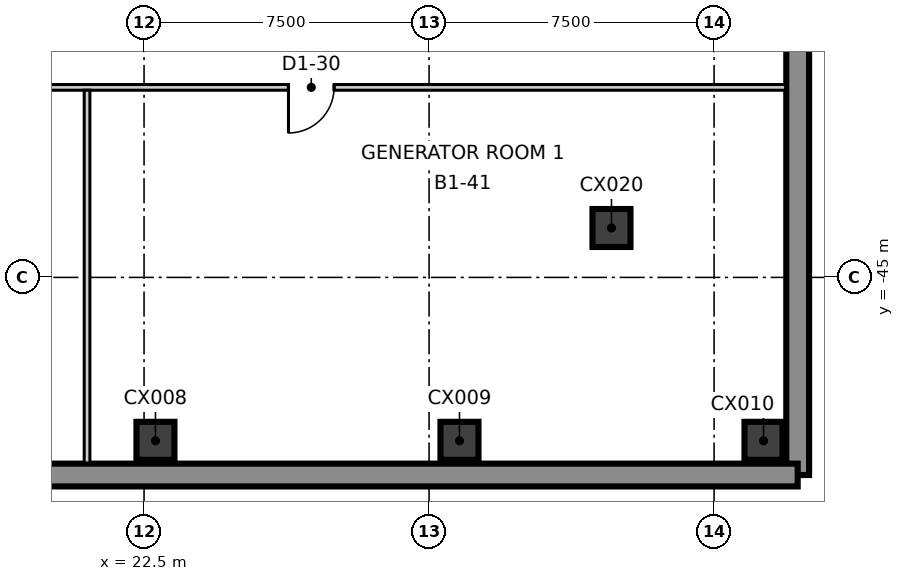
"""IFC4 building model, lengths in metres.
Left out: names, types, materials, properties, quantities, classifications, styles, units other than length and angle.
Written with IfcOpenShell. Run it as: python <this file> out.ifc"""

import sys

from ifc_helpers import new_model, si_unit, direction, frame, frame_2d, origin, origin_2d, place, context, subcontext, project, spatial, rectangle, extrude, element, fill, save


model = new_model("IFC4")
c1 = context("Model", 3, precision=1e-05, world=origin(), true_north=direction((0.0, 1.0)))
c2 = subcontext(c1, "Body", "Model", "MODEL_VIEW")
j1 = project(units=[si_unit("LENGTHUNIT", "METRE"), si_unit("PLANEANGLEUNIT", "RADIAN")], contexts=[c1])
p1 = place(None, origin())
s1 = spatial("IfcSite", under=j1, at=p1, CompositionType="ELEMENT")
p2 = place(p1, origin())
s2 = spatial("IfcBuilding", under=s1, at=p2, CompositionType="ELEMENT")
p3 = place(p2, frame((0.0, 0.0, -5.5)))
s3 = spatial("IfcBuildingStorey", under=s2, at=p3, CompositionType="ELEMENT", Elevation=-5.5)
p4 = place(p3, frame((39.7, -50.2, -0.4), z_axis=(0.0, 0.0, 1.0), x_axis=(0.0, 1.0, 0.0)))
e1 = element("IfcWall", 1, at=p4, inside=s3, PredefinedType="SOLIDWALL", context=c2, shape_type="SweptSolid", body=[
    extrude(rectangle(XDim=27.4, YDim=0.6, at=frame_2d((13.7, 0.0))), origin(), (0.0, 0.0, 1.0), 5.5),
])
p5 = place(p3, frame((-39.7, -50.2, -0.4), z_axis=(0.0, 0.0, 1.0), x_axis=(1.0, 0.0, 0.0)))
e2 = element("IfcWall", 2, at=p5, inside=s3, PredefinedType="SOLIDWALL", context=c2, shape_type="SweptSolid", body=[
    extrude(rectangle(XDim=79.4, YDim=0.6, at=frame_2d((39.7, 0.0))), origin(), (0.0, 0.0, 1.0), 5.5),
])
for number, where, z_axis, x_axis in (
    (3, (22.8, -49.3, -0.4), (0.0, 0.0, 1.0), (1.0, 0.0, 0.0)),
    (4, (30.8, -49.3, -0.4), (0.0, 0.0, 1.0), (1.0, 0.0, 0.0)),
    (5, (38.8, -49.3, -0.4), (0.0, 0.0, 1.0), (1.0, 0.0, 0.0)),
    (6, (34.8, -43.7, -0.4), (0.0, 0.0, 1.0), (1.0, 0.0, 0.0)),
):
    element("IfcColumn", number, at=place(p3, frame(where, z_axis=z_axis, x_axis=x_axis)), inside=s3, PredefinedType="COLUMN", context=c2, shape_type="SweptSolid", body=[
        extrude(rectangle(XDim=1.0, YDim=1.0, at=origin_2d()), origin(), (0.0, 0.0, 1.0), 5.5),
    ])
p6 = place(p3, frame((-39.4, -40.0, 0.0), z_axis=(0.0, 0.0, 1.0), x_axis=(1.0, 0.0, 0.0)))
e7 = element("IfcWall", 7, at=p6, inside=s3, PredefinedType="PARTITIONING", context=c2, shape_type="SweptSolid", body=[
    extrude(rectangle(XDim=78.8, YDim=0.15, at=frame_2d((39.4, 0.0))), origin(), (0.0, 0.0, 1.0), 5.1),
])
p7 = place(p6, frame((9.6, 0.0, 0.0)))
e8 = element("IfcOpeningElement", 8, at=p7, cuts=e7, PredefinedType="OPENING", context=c2, shape_type="SweptSolid", body=[
    extrude(rectangle(XDim=1.2, YDim=2.1, at=frame_2d((0.6, 1.05))), frame((0.0, 0.085, 0.0), z_axis=(0.0, -1.0, 0.0), x_axis=(1.0, 0.0, 0.0)), (0.0, 0.0, 1.0), 0.17),
])
p8 = place(p6, frame((24.9, 0.0, 0.0)))
e9 = element("IfcOpeningElement", 9, at=p8, cuts=e7, PredefinedType="OPENING", context=c2, shape_type="SweptSolid", body=[
    extrude(rectangle(XDim=1.0, YDim=2.1, at=frame_2d((0.5, 1.05))), frame((0.0, 0.085, 0.0), z_axis=(0.0, -1.0, 0.0), x_axis=(1.0, 0.0, 0.0)), (0.0, 0.0, 1.0), 0.17),
])
p9 = place(p6, frame((33.54, 0.0, 0.0)))
e10 = element("IfcOpeningElement", 10, at=p9, cuts=e7, PredefinedType="OPENING", context=c2, shape_type="SweptSolid", body=[
    extrude(rectangle(XDim=1.0, YDim=2.1, at=frame_2d((0.5, 1.05))), frame((0.0, 0.085, 0.0), z_axis=(0.0, -1.0, 0.0), x_axis=(1.0, 0.0, 0.0)), (0.0, 0.0, 1.0), 0.17),
])
p10 = place(p6, frame((44.4, 0.0, 0.0)))
e11 = element("IfcOpeningElement", 11, at=p10, cuts=e7, PredefinedType="OPENING", context=c2, shape_type="SweptSolid", body=[
    extrude(rectangle(XDim=1.0, YDim=2.1, at=frame_2d((0.5, 1.05))), frame((0.0, 0.085, 0.0), z_axis=(0.0, -1.0, 0.0), x_axis=(1.0, 0.0, 0.0)), (0.0, 0.0, 1.0), 0.17),
])
p11 = place(p6, frame((53.9, 0.0, 0.0)))
e12 = element("IfcOpeningElement", 12, at=p11, cuts=e7, PredefinedType="OPENING", context=c2, shape_type="SweptSolid", body=[
    extrude(rectangle(XDim=1.0, YDim=2.1, at=frame_2d((0.5, 1.05))), frame((0.0, 0.085, 0.0), z_axis=(0.0, -1.0, 0.0), x_axis=(1.0, 0.0, 0.0)), (0.0, 0.0, 1.0), 0.17),
])
p12 = place(p6, frame((65.7, 0.0, 0.0)))
e13 = element("IfcOpeningElement", 13, at=p12, cuts=e7, PredefinedType="OPENING", context=c2, shape_type="SweptSolid", body=[
    extrude(rectangle(XDim=1.2, YDim=2.1, at=frame_2d((0.6, 1.05))), frame((0.0, 0.085, 0.0), z_axis=(0.0, -1.0, 0.0), x_axis=(1.0, 0.0, 0.0)), (0.0, 0.0, 1.0), 0.17),
])
p13 = place(p3, frame((21.0, -49.9, 0.0), z_axis=(0.0, 0.0, 1.0), x_axis=(0.0, 1.0, 0.0)))
e14 = element("IfcWall", 14, at=p13, inside=s3, PredefinedType="PARTITIONING", context=c2, shape_type="SweptSolid", body=[
    extrude(rectangle(XDim=9.825, YDim=0.15, at=frame_2d((4.913, 0.0))), origin(), (0.0, 0.0, 1.0), 5.1),
])
p14 = place(p12, origin())
e15 = element("IfcDoor", 15, at=p14, inside=s3, OperationType="SINGLE_SWING_LEFT", PredefinedType="DOOR", context=c2, shape_type="SweptSolid", body=[
    extrude(rectangle(XDim=1.2, YDim=2.1, at=frame_2d((0.6, 1.05))), frame((0.0, 0.025, 0.0), z_axis=(0.0, -1.0, 0.0), x_axis=(1.0, 0.0, 0.0)), (0.0, 0.0, 1.0), 0.05),
])
fill(e13, e15)
save(model, sys.argv[1])
